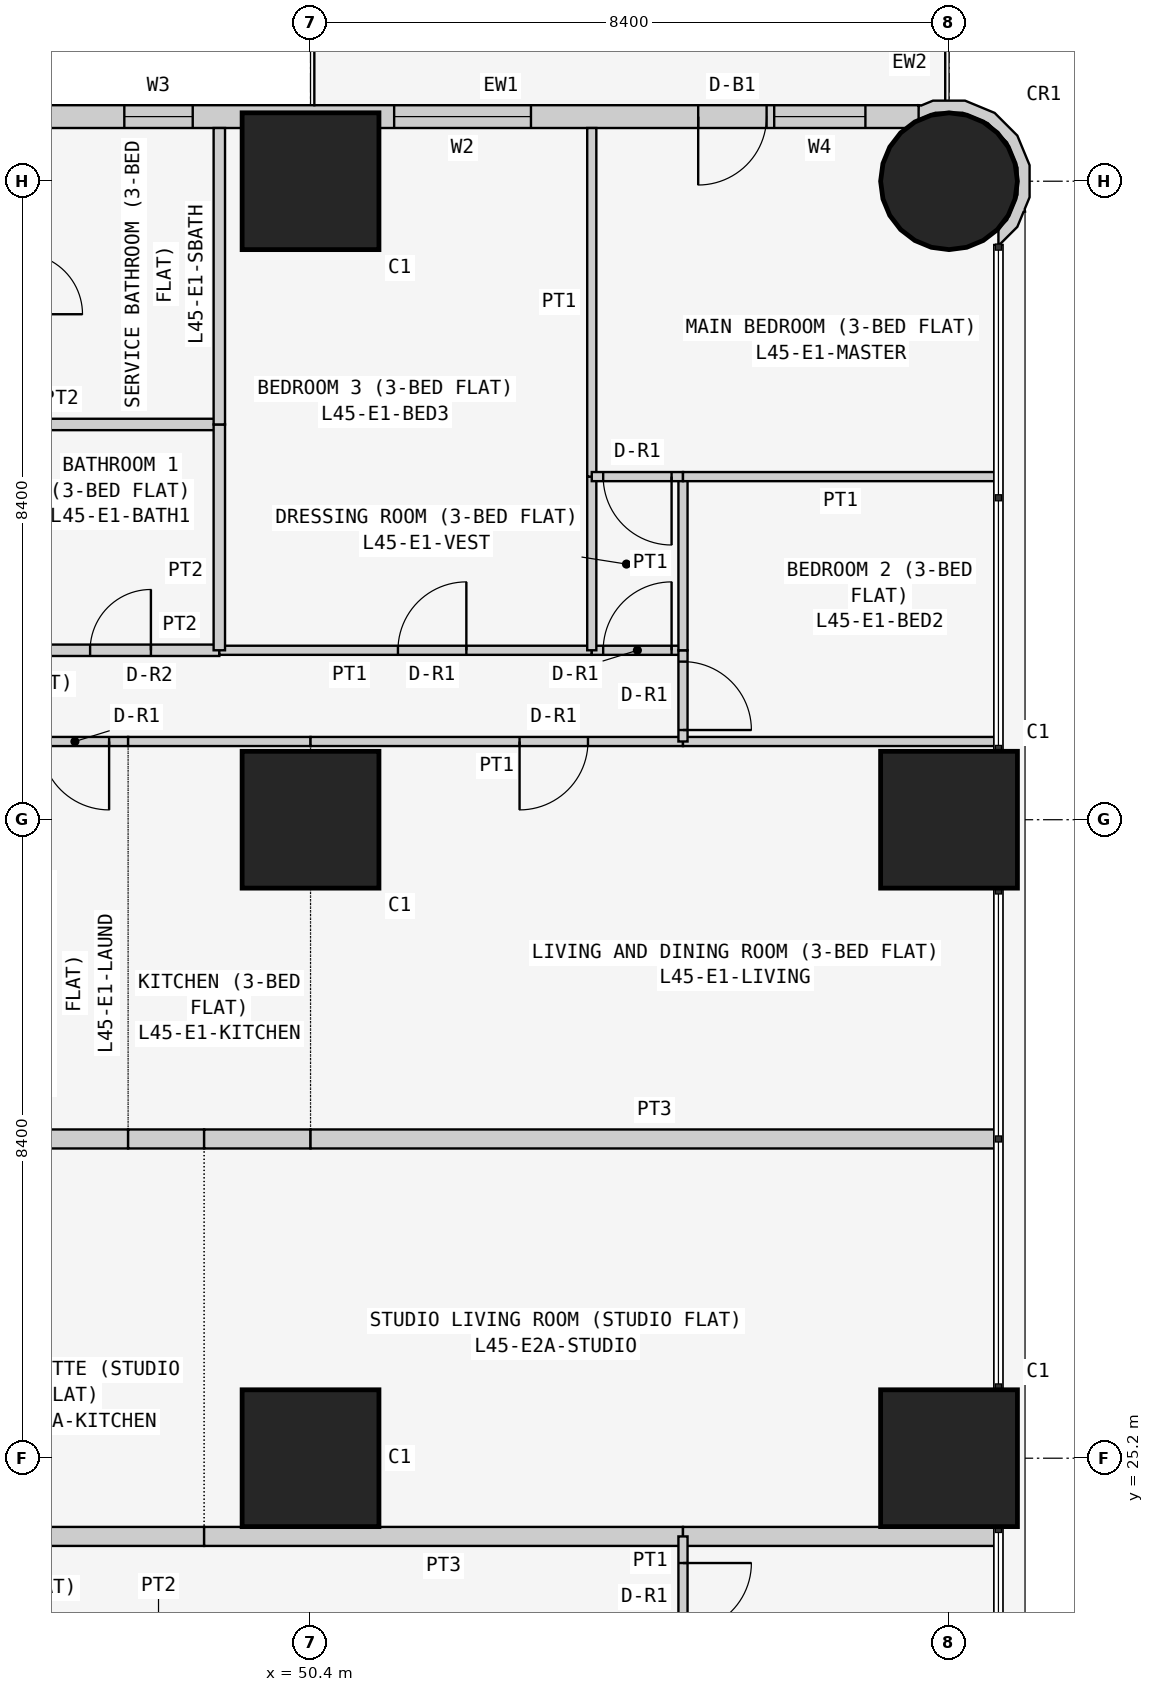
"""IFC4 building model, lengths in metres.
Left out: names, types, materials, properties, quantities, classifications, styles, units other than length and angle.
Written with IfcOpenShell. Run it as: python <this file> out.ifc"""

import sys

from ifc_helpers import new_model, si_unit, direction, frame, frame_2d, origin, origin_2d, place, context, subcontext, project, spatial, polyline, rectangle, circle, outline, extrude, element, fill, save


model = new_model("IFC4")
c1 = context("Model", 3, precision=1e-05, world=origin(), true_north=direction((0.0, 1.0)))
c2 = subcontext(c1, "Body", "Model", "MODEL_VIEW")
j1 = project(units=[si_unit("LENGTHUNIT", "METRE"), si_unit("PLANEANGLEUNIT", "RADIAN")], contexts=[c1])
p1 = place(None, origin())
s1 = spatial("IfcSite", under=j1, at=p1, CompositionType="ELEMENT")
p2 = place(p1, origin())
s2 = spatial("IfcBuilding", under=s1, at=p2, CompositionType="ELEMENT")
p3 = place(p2, frame((0.0, 0.0, 173.7)))
s3 = spatial("IfcBuildingStorey", under=s2, at=p3, CompositionType="ELEMENT", Elevation=173.7)
for number, where, z_axis, x_axis in (
    (1, (50.4, 25.2, 0.0), (0.0, 0.0, 1.0), (1.0, 0.0, 0.0)),
    (2, (50.4, 33.6, 0.0), (0.0, 0.0, 1.0), (1.0, 0.0, 0.0)),
    (3, (50.4, 42.0, 0.0), (0.0, 0.0, 1.0), (1.0, 0.0, 0.0)),
    (4, (58.8, 25.2, 0.0), (0.0, 0.0, 1.0), (1.0, 0.0, 0.0)),
    (5, (58.8, 33.6, 0.0), (0.0, 0.0, 1.0), (1.0, 0.0, 0.0)),
):
    element("IfcColumn", number, at=place(p3, frame(where, z_axis=z_axis, x_axis=x_axis)), inside=s3, PredefinedType="COLUMN", context=c2, shape_type="SweptSolid", body=[
        extrude(rectangle(XDim=1.8, YDim=1.8, at=origin_2d()), origin(), (0.0, 0.0, 1.0), 3.6),
    ])
p4 = place(p3, frame((58.8, 42.0, 0.0), z_axis=(0.0, 0.0, 1.0), x_axis=(1.0, 0.0, 0.0)))
e6 = element("IfcColumn", 6, at=p4, inside=s3, PredefinedType="COLUMN", context=c2, shape_type="SweptSolid", body=[
    extrude(circle(Radius=0.9, at=origin_2d()), origin(), (0.0, 0.0, 1.0), 3.6),
])
p5 = place(p3, frame((58.4, 42.85, 0.0), z_axis=(0.0, 0.0, 1.0), x_axis=(-1.0, 0.0, 0.0)))
e7 = element("IfcWall", 7, at=p5, inside=s3, PredefinedType="SOLIDWALL", context=c2, shape_type="SweptSolid", body=[
    extrude(rectangle(XDim=15.7, YDim=0.3, at=frame_2d((7.85, 0.0))), origin(), (0.0, 0.0, 1.0), 3.35),
])
p6 = place(p5, frame((12.4, 0.0, 0.9)))
e8 = element("IfcOpeningElement", 8, at=p6, cuts=e7, PredefinedType="OPENING", context=c2, shape_type="SweptSolid", body=[
    extrude(rectangle(XDim=1.8, YDim=1.5, at=frame_2d((0.9, 0.75))), frame((0.0, 0.16, 0.0), z_axis=(0.0, -1.0, 0.0), x_axis=(1.0, 0.0, 0.0)), (0.0, 0.0, 1.0), 0.32),
])
p7 = place(p5, frame((9.55, 0.0, 1.5)))
e9 = element("IfcOpeningElement", 9, at=p7, cuts=e7, PredefinedType="OPENING", context=c2, shape_type="SweptSolid", body=[
    extrude(rectangle(XDim=0.9, YDim=0.7, at=frame_2d((0.45, 0.35))), frame((0.0, 0.16, 0.0), z_axis=(0.0, -1.0, 0.0), x_axis=(1.0, 0.0, 0.0)), (0.0, 0.0, 1.0), 0.32),
])
p8 = place(p5, frame((5.1, 0.0, 0.9)))
e10 = element("IfcOpeningElement", 10, at=p8, cuts=e7, PredefinedType="OPENING", context=c2, shape_type="SweptSolid", body=[
    extrude(rectangle(XDim=1.8, YDim=1.5, at=frame_2d((0.9, 0.75))), frame((0.0, 0.16, 0.0), z_axis=(0.0, -1.0, 0.0), x_axis=(1.0, 0.0, 0.0)), (0.0, 0.0, 1.0), 0.32),
])
p9 = place(p5, frame((2.0, 0.0, 0.0)))
e11 = element("IfcOpeningElement", 11, at=p9, cuts=e7, PredefinedType="OPENING", context=c2, shape_type="SweptSolid", body=[
    extrude(rectangle(XDim=0.9, YDim=2.4, at=frame_2d((0.45, 1.2))), frame((0.0, 0.16, 0.0), z_axis=(0.0, -1.0, 0.0), x_axis=(1.0, 0.0, 0.0)), (0.0, 0.0, 1.0), 0.32),
])
p10 = place(p5, frame((0.7, 0.0, 0.9)))
e12 = element("IfcOpeningElement", 12, at=p10, cuts=e7, PredefinedType="OPENING", context=c2, shape_type="SweptSolid", body=[
    extrude(rectangle(XDim=1.2, YDim=1.5, at=frame_2d((0.6, 0.75))), frame((0.0, 0.16, 0.0), z_axis=(0.0, -1.0, 0.0), x_axis=(1.0, 0.0, 0.0)), (0.0, 0.0, 1.0), 0.32),
])
p11 = place(p3, frame((59.411, 41.233, 0.0), z_axis=(0.0, 0.0, 1.0), x_axis=(0.926129809145, 0.377204953059, 0.0)))
e13 = element("IfcWall", 13, at=p11, inside=s3, PredefinedType="SOLIDWALL", context=c2, shape_type="SweptSolid", body=[
    extrude(outline(polyline([(0.626, 0.345), (0.785, 0.736), (0.782, 1.157), (0.619, 1.546), (0.319, 1.843), (-0.072, 2.002), (-0.24, 2.001), (-0.27, 2.017), (-0.37, 1.841), (-0.102, 1.842), (0.23, 1.707), (0.485, 1.455), (0.624, 1.125), (0.626, 0.766), (0.491, 0.434), (0.238, 0.179), (0.09, 0.117), (0.011, -0.078), (0.024, -0.083), (0.329, 0.045), (0.48, 0.198), (0.499, 0.193), (0.508, 0.225), (0.626, 0.345)])), origin(), (0.0, 0.0, 1.0), 3.35),
])
p12 = place(p3, frame((48.0, 34.629, 0.0), z_axis=(0.0, 0.0, 1.0), x_axis=(-1.0, 0.0, 0.0)))
e14 = element("IfcWall", 14, at=p12, inside=s3, PredefinedType="PARTITIONING", context=c2, shape_type="SweptSolid", body=[
    extrude(rectangle(XDim=1.4, YDim=0.12, at=frame_2d((0.7, 0.0))), origin(), (0.0, 0.0, 1.0), 3.35),
])
p13 = place(p12, frame((0.25, 0.0, 0.0)))
e15 = element("IfcOpeningElement", 15, at=p13, cuts=e14, PredefinedType="OPENING", context=c2, shape_type="SweptSolid", body=[
    extrude(rectangle(XDim=0.9, YDim=2.1, at=frame_2d((0.45, 1.05))), frame((0.0, 0.07, 0.0), z_axis=(0.0, -1.0, 0.0), x_axis=(1.0, 0.0, 0.0)), (0.0, 0.0, 1.0), 0.14),
])
p14 = place(p3, frame((46.6, 29.4, 0.0), z_axis=(0.0, 0.0, 1.0), x_axis=(1.0, 0.0, 0.0)))
e16 = element("IfcWall", 16, at=p14, inside=s3, PredefinedType="PARTITIONING", context=c2, shape_type="SweptSolid", body=[
    extrude(rectangle(XDim=1.4, YDim=0.25, at=frame_2d((0.7, 0.0))), origin(), (0.0, 0.0, 1.0), 3.35),
])
p15 = place(p3, frame((50.4, 34.629, 0.0), z_axis=(0.0, 0.0, 1.0), x_axis=(-1.0, 0.0, 0.0)))
e17 = element("IfcWall", 17, at=p15, inside=s3, PredefinedType="PARTITIONING", context=c2, shape_type="SweptSolid", body=[
    extrude(rectangle(XDim=2.4, YDim=0.12, at=frame_2d((1.2, 0.0))), origin(), (0.0, 0.0, 1.0), 3.35),
])
p16 = place(p3, frame((48.0, 29.4, 0.0), z_axis=(0.0, 0.0, 1.0), x_axis=(1.0, 0.0, 0.0)))
e18 = element("IfcWall", 18, at=p16, inside=s3, PredefinedType="PARTITIONING", context=c2, shape_type="SweptSolid", body=[
    extrude(rectangle(XDim=1.0, YDim=0.25, at=frame_2d((0.5, 0.0))), origin(), (0.0, 0.0, 1.0), 3.35),
])
p17 = place(p3, frame((49.0, 29.4, 0.0), z_axis=(0.0, 0.0, 1.0), x_axis=(1.0, 0.0, 0.0)))
e19 = element("IfcWall", 19, at=p17, inside=s3, PredefinedType="PARTITIONING", context=c2, shape_type="SweptSolid", body=[
    extrude(rectangle(XDim=1.4, YDim=0.25, at=frame_2d((0.7, 0.0))), origin(), (0.0, 0.0, 1.0), 3.35),
])
p18 = place(p3, frame((55.3, 34.629, 0.0), z_axis=(0.0, 0.0, 1.0), x_axis=(-1.0, 0.0, 0.0)))
e20 = element("IfcWall", 20, at=p18, inside=s3, PredefinedType="PARTITIONING", context=c2, shape_type="SweptSolid", body=[
    extrude(rectangle(XDim=4.9, YDim=0.12, at=frame_2d((2.45, 0.0))), origin(), (0.0, 0.0, 1.0), 3.35),
])
p19 = place(p18, frame((1.25, 0.0, 0.0)))
e21 = element("IfcOpeningElement", 21, at=p19, cuts=e20, PredefinedType="OPENING", context=c2, shape_type="SweptSolid", body=[
    extrude(rectangle(XDim=0.9, YDim=2.1, at=frame_2d((0.45, 1.05))), frame((0.0, 0.07, 0.0), z_axis=(0.0, -1.0, 0.0), x_axis=(1.0, 0.0, 0.0)), (0.0, 0.0, 1.0), 0.14),
])
p20 = place(p3, frame((59.45, 34.629, 0.0), z_axis=(0.0, 0.0, 1.0), x_axis=(-1.0, 0.0, 0.0)))
e22 = element("IfcWall", 22, at=p20, inside=s3, PredefinedType="PARTITIONING", context=c2, shape_type="SweptSolid", body=[
    extrude(rectangle(XDim=4.15, YDim=0.12, at=frame_2d((2.075, 0.0))), origin(), (0.0, 0.0, 1.0), 3.35),
])
p21 = place(p3, frame((50.4, 29.4, 0.0), z_axis=(0.0, 0.0, 1.0), x_axis=(1.0, 0.0, 0.0)))
e23 = element("IfcWall", 23, at=p21, inside=s3, PredefinedType="PARTITIONING", context=c2, shape_type="SweptSolid", body=[
    extrude(rectangle(XDim=9.05, YDim=0.25, at=frame_2d((4.525, 0.0))), origin(), (0.0, 0.0, 1.0), 3.35),
])
p22 = place(p3, frame((49.2, 35.829, 0.0), z_axis=(0.0, 0.0, 1.0), x_axis=(-1.0, 0.0, 0.0)))
e24 = element("IfcWall", 24, at=p22, inside=s3, PredefinedType="PARTITIONING", context=c2, shape_type="SweptSolid", body=[
    extrude(rectangle(XDim=2.6, YDim=0.15, at=frame_2d((1.3, 0.0))), origin(), (0.0, 0.0, 1.0), 3.35),
])
p23 = place(p22, frame((0.9, 0.0, 0.0)))
e25 = element("IfcOpeningElement", 25, at=p23, cuts=e24, PredefinedType="OPENING", context=c2, shape_type="SweptSolid", body=[
    extrude(rectangle(XDim=0.8, YDim=2.1, at=frame_2d((0.4, 1.05))), frame((0.0, 0.085, 0.0), z_axis=(0.0, -1.0, 0.0), x_axis=(1.0, 0.0, 0.0)), (0.0, 0.0, 1.0), 0.17),
])
p24 = place(p3, frame((54.1, 35.829, 0.0), z_axis=(0.0, 0.0, 1.0), x_axis=(-1.0, 0.0, 0.0)))
e26 = element("IfcWall", 26, at=p24, inside=s3, PredefinedType="PARTITIONING", context=c2, shape_type="SweptSolid", body=[
    extrude(rectangle(XDim=4.9, YDim=0.12, at=frame_2d((2.45, 0.0))), origin(), (0.0, 0.0, 1.0), 3.35),
])
p25 = place(p24, frame((1.65, 0.0, 0.0)))
e27 = element("IfcOpeningElement", 27, at=p25, cuts=e26, PredefinedType="OPENING", context=c2, shape_type="SweptSolid", body=[
    extrude(rectangle(XDim=0.9, YDim=2.1, at=frame_2d((0.45, 1.05))), frame((0.0, 0.07, 0.0), z_axis=(0.0, -1.0, 0.0), x_axis=(1.0, 0.0, 0.0)), (0.0, 0.0, 1.0), 0.14),
])
p26 = place(p3, frame((55.3, 35.829, 0.0), z_axis=(0.0, 0.0, 1.0), x_axis=(-1.0, 0.0, 0.0)))
e28 = element("IfcWall", 28, at=p26, inside=s3, PredefinedType="PARTITIONING", context=c2, shape_type="SweptSolid", body=[
    extrude(rectangle(XDim=1.2, YDim=0.12, at=frame_2d((0.6, 0.0))), origin(), (0.0, 0.0, 1.0), 3.35),
])
p27 = place(p26, frame((0.15, 0.0, 0.0)))
e29 = element("IfcOpeningElement", 29, at=p27, cuts=e28, PredefinedType="OPENING", context=c2, shape_type="SweptSolid", body=[
    extrude(rectangle(XDim=0.9, YDim=2.1, at=frame_2d((0.45, 1.05))), frame((0.0, 0.07, 0.0), z_axis=(0.0, -1.0, 0.0), x_axis=(1.0, 0.0, 0.0)), (0.0, 0.0, 1.0), 0.14),
])
p28 = place(p3, frame((55.3, 34.629, 0.0), z_axis=(0.0, 0.0, 1.0), x_axis=(0.0, 1.0, 0.0)))
e30 = element("IfcWall", 30, at=p28, inside=s3, PredefinedType="PARTITIONING", context=c2, shape_type="SweptSolid", body=[
    extrude(rectangle(XDim=1.2, YDim=0.12, at=frame_2d((0.6, 0.0))), origin(), (0.0, 0.0, 1.0), 3.35),
])
p29 = place(p28, frame((0.151, 0.0, 0.0)))
e31 = element("IfcOpeningElement", 31, at=p29, cuts=e30, PredefinedType="OPENING", context=c2, shape_type="SweptSolid", body=[
    extrude(rectangle(XDim=0.9, YDim=2.1, at=frame_2d((0.45, 1.05))), frame((0.0, 0.07, 0.0), z_axis=(0.0, -1.0, 0.0), x_axis=(1.0, 0.0, 0.0)), (0.0, 0.0, 1.0), 0.14),
])
p30 = place(p3, frame((49.2, 38.8, 0.0), z_axis=(0.0, 0.0, 1.0), x_axis=(-1.0, 0.0, 0.0)))
e32 = element("IfcWall", 32, at=p30, inside=s3, PredefinedType="PARTITIONING", context=c2, shape_type="SweptSolid", body=[
    extrude(rectangle(XDim=2.6, YDim=0.15, at=frame_2d((1.3, 0.0))), origin(), (0.0, 0.0, 1.0), 3.35),
])
p31 = place(p3, frame((49.2, 35.829, 0.0), z_axis=(0.0, 0.0, 1.0), x_axis=(0.0, 1.0, 0.0)))
e33 = element("IfcWall", 33, at=p31, inside=s3, PredefinedType="PARTITIONING", context=c2, shape_type="SweptSolid", body=[
    extrude(rectangle(XDim=2.971, YDim=0.15, at=frame_2d((1.485, 0.0))), origin(), (0.0, 0.0, 1.0), 3.35),
])
p32 = place(p3, frame((49.2, 38.8, 0.0), z_axis=(0.0, 0.0, 1.0), x_axis=(0.0, 1.0, 0.0)))
e34 = element("IfcWall", 34, at=p32, inside=s3, PredefinedType="PARTITIONING", context=c2, shape_type="SweptSolid", body=[
    extrude(rectangle(XDim=3.9, YDim=0.15, at=frame_2d((1.95, 0.0))), origin(), (0.0, 0.0, 1.0), 3.35),
])
p33 = place(p3, frame((54.1, 35.829, 0.0), z_axis=(0.0, 0.0, 1.0), x_axis=(0.0, 1.0, 0.0)))
e35 = element("IfcWall", 35, at=p33, inside=s3, PredefinedType="PARTITIONING", context=c2, shape_type="SweptSolid", body=[
    extrude(rectangle(XDim=2.285, YDim=0.12, at=frame_2d((1.143, 0.0))), origin(), (0.0, 0.0, 1.0), 3.35),
])
p34 = place(p3, frame((54.1, 38.114, 0.0), z_axis=(0.0, 0.0, 1.0), x_axis=(0.0, 1.0, 0.0)))
e36 = element("IfcWall", 36, at=p34, inside=s3, PredefinedType="PARTITIONING", context=c2, shape_type="SweptSolid", body=[
    extrude(rectangle(XDim=4.586, YDim=0.12, at=frame_2d((2.293, 0.0))), origin(), (0.0, 0.0, 1.0), 3.35),
])
p35 = place(p3, frame((55.3, 35.829, 0.0), z_axis=(0.0, 0.0, 1.0), x_axis=(0.0, 1.0, 0.0)))
e37 = element("IfcWall", 37, at=p35, inside=s3, PredefinedType="PARTITIONING", context=c2, shape_type="SweptSolid", body=[
    extrude(rectangle(XDim=2.285, YDim=0.12, at=frame_2d((1.143, 0.0))), origin(), (0.0, 0.0, 1.0), 3.35),
])
p36 = place(p3, frame((55.3, 38.114, 0.0), z_axis=(0.0, 0.0, 1.0), x_axis=(-1.0, 0.0, 0.0)))
e38 = element("IfcWall", 38, at=p36, inside=s3, PredefinedType="PARTITIONING", context=c2, shape_type="SweptSolid", body=[
    extrude(rectangle(XDim=1.2, YDim=0.12, at=frame_2d((0.6, 0.0))), origin(), (0.0, 0.0, 1.0), 3.35),
])
p37 = place(p36, frame((0.15, 0.0, 0.0)))
e39 = element("IfcOpeningElement", 39, at=p37, cuts=e38, PredefinedType="OPENING", context=c2, shape_type="SweptSolid", body=[
    extrude(rectangle(XDim=0.9, YDim=2.1, at=frame_2d((0.45, 1.05))), frame((0.0, 0.07, 0.0), z_axis=(0.0, -1.0, 0.0), x_axis=(1.0, 0.0, 0.0)), (0.0, 0.0, 1.0), 0.14),
])
p38 = place(p3, frame((59.45, 38.114, 0.0), z_axis=(0.0, 0.0, 1.0), x_axis=(-1.0, 0.0, 0.0)))
e40 = element("IfcWall", 40, at=p38, inside=s3, PredefinedType="PARTITIONING", context=c2, shape_type="SweptSolid", body=[
    extrude(rectangle(XDim=4.15, YDim=0.12, at=frame_2d((2.075, 0.0))), origin(), (0.0, 0.0, 1.0), 3.35),
])
p39 = place(p3, frame((49.0, 24.171, 0.0), z_axis=(0.0, 0.0, 1.0), x_axis=(-1.0, 0.0, 0.0)))
e41 = element("IfcWall", 41, at=p39, inside=s3, PredefinedType="PARTITIONING", context=c2, shape_type="SweptSolid", body=[
    extrude(rectangle(XDim=3.6, YDim=0.25, at=frame_2d((1.8, 0.0))), origin(), (0.0, 0.0, 1.0), 3.35),
])
p40 = place(p3, frame((55.3, 24.171, 0.0), z_axis=(0.0, 0.0, 1.0), x_axis=(-1.0, 0.0, 0.0)))
e42 = element("IfcWall", 42, at=p40, inside=s3, PredefinedType="PARTITIONING", context=c2, shape_type="SweptSolid", body=[
    extrude(rectangle(XDim=6.3, YDim=0.25, at=frame_2d((3.15, 0.0))), origin(), (0.0, 0.0, 1.0), 3.35),
])
p41 = place(p3, frame((59.45, 24.171, 0.0), z_axis=(0.0, 0.0, 1.0), x_axis=(-1.0, 0.0, 0.0)))
e43 = element("IfcWall", 43, at=p41, inside=s3, PredefinedType="PARTITIONING", context=c2, shape_type="SweptSolid", body=[
    extrude(rectangle(XDim=4.15, YDim=0.25, at=frame_2d((2.075, 0.0))), origin(), (0.0, 0.0, 1.0), 3.35),
])
p42 = place(p3, frame((55.3, 24.171, 0.0), z_axis=(0.0, 0.0, 1.0), x_axis=(0.0, -1.0, 0.0)))
e44 = element("IfcWall", 44, at=p42, inside=s3, PredefinedType="PARTITIONING", context=c2, shape_type="SweptSolid", body=[
    extrude(rectangle(XDim=1.6, YDim=0.12, at=frame_2d((0.8, 0.0))), origin(), (0.0, 0.0, 1.0), 3.35),
])
p43 = place(p42, frame((0.35, 0.0, 0.0)))
e45 = element("IfcOpeningElement", 45, at=p43, cuts=e44, PredefinedType="OPENING", context=c2, shape_type="SweptSolid", body=[
    extrude(rectangle(XDim=0.9, YDim=2.1, at=frame_2d((0.45, 1.05))), frame((0.0, 0.07, 0.0), z_axis=(0.0, -1.0, 0.0), x_axis=(1.0, 0.0, 0.0)), (0.0, 0.0, 1.0), 0.14),
])
p44 = place(p7, origin())
e46 = element("IfcWindow", 46, at=p44, inside=s3, PartitioningType="SINGLE_PANEL", PredefinedType="WINDOW", context=c2, shape_type="SweptSolid", body=[
    extrude(rectangle(XDim=0.9, YDim=0.7, at=frame_2d((0.45, 0.35))), frame((0.0, 0.03, 0.0), z_axis=(0.0, -1.0, 0.0), x_axis=(1.0, 0.0, 0.0)), (0.0, 0.0, 1.0), 0.06),
])
fill(e9, e46)
p45 = place(p8, origin())
e47 = element("IfcWindow", 47, at=p45, inside=s3, PartitioningType="SINGLE_PANEL", PredefinedType="WINDOW", context=c2, shape_type="SweptSolid", body=[
    extrude(rectangle(XDim=1.8, YDim=1.5, at=frame_2d((0.9, 0.75))), frame((0.0, 0.03, 0.0), z_axis=(0.0, -1.0, 0.0), x_axis=(1.0, 0.0, 0.0)), (0.0, 0.0, 1.0), 0.06),
])
fill(e10, e47)
p46 = place(p9, origin())
e48 = element("IfcDoor", 48, at=p46, inside=s3, OperationType="SINGLE_SWING_RIGHT", PredefinedType="DOOR", context=c2, shape_type="SweptSolid", body=[
    extrude(rectangle(XDim=0.9, YDim=2.4, at=frame_2d((0.45, 1.2))), frame((0.0, 0.025, 0.0), z_axis=(0.0, -1.0, 0.0), x_axis=(1.0, 0.0, 0.0)), (0.0, 0.0, 1.0), 0.05),
])
fill(e11, e48)
p47 = place(p10, origin())
e49 = element("IfcWindow", 49, at=p47, inside=s3, PartitioningType="SINGLE_PANEL", PredefinedType="WINDOW", context=c2, shape_type="SweptSolid", body=[
    extrude(rectangle(XDim=1.2, YDim=1.5, at=frame_2d((0.6, 0.75))), frame((0.0, 0.03, 0.0), z_axis=(0.0, -1.0, 0.0), x_axis=(1.0, 0.0, 0.0)), (0.0, 0.0, 1.0), 0.06),
])
fill(e12, e49)
p48 = place(p13, origin())
e50 = element("IfcDoor", 50, at=p48, inside=s3, OperationType="SINGLE_SWING_LEFT", PredefinedType="DOOR", context=c2, shape_type="SweptSolid", body=[
    extrude(rectangle(XDim=0.9, YDim=2.1, at=frame_2d((0.45, 1.05))), frame((0.0, 0.025, 0.0), z_axis=(0.0, -1.0, 0.0), x_axis=(1.0, 0.0, 0.0)), (0.0, 0.0, 1.0), 0.05),
])
fill(e15, e50)
p49 = place(p19, origin())
e51 = element("IfcDoor", 51, at=p49, inside=s3, OperationType="SINGLE_SWING_RIGHT", PredefinedType="DOOR", context=c2, shape_type="SweptSolid", body=[
    extrude(rectangle(XDim=0.9, YDim=2.1, at=frame_2d((0.45, 1.05))), frame((0.0, 0.025, 0.0), z_axis=(0.0, -1.0, 0.0), x_axis=(1.0, 0.0, 0.0)), (0.0, 0.0, 1.0), 0.05),
])
fill(e21, e51)
p50 = place(p23, frame((0.8, 0.0, 0.0), z_axis=(0.0, 0.0, 1.0), x_axis=(-1.0, 0.0, 0.0)))
e52 = element("IfcDoor", 52, at=p50, inside=s3, OperationType="SINGLE_SWING_RIGHT", PredefinedType="DOOR", context=c2, shape_type="SweptSolid", body=[
    extrude(rectangle(XDim=0.8, YDim=2.1, at=frame_2d((0.4, 1.05))), frame((0.0, 0.025, 0.0), z_axis=(0.0, -1.0, 0.0), x_axis=(1.0, 0.0, 0.0)), (0.0, 0.0, 1.0), 0.05),
])
fill(e25, e52)
p51 = place(p25, frame((0.9, 0.0, 0.0), z_axis=(0.0, 0.0, 1.0), x_axis=(-1.0, 0.0, 0.0)))
e53 = element("IfcDoor", 53, at=p51, inside=s3, OperationType="SINGLE_SWING_RIGHT", PredefinedType="DOOR", context=c2, shape_type="SweptSolid", body=[
    extrude(rectangle(XDim=0.9, YDim=2.1, at=frame_2d((0.45, 1.05))), frame((0.0, 0.025, 0.0), z_axis=(0.0, -1.0, 0.0), x_axis=(1.0, 0.0, 0.0)), (0.0, 0.0, 1.0), 0.05),
])
fill(e27, e53)
p52 = place(p27, frame((0.9, 0.0, 0.0), z_axis=(0.0, 0.0, 1.0), x_axis=(-1.0, 0.0, 0.0)))
e54 = element("IfcDoor", 54, at=p52, inside=s3, OperationType="SINGLE_SWING_RIGHT", PredefinedType="DOOR", context=c2, shape_type="SweptSolid", body=[
    extrude(rectangle(XDim=0.9, YDim=2.1, at=frame_2d((0.45, 1.05))), frame((0.0, 0.025, 0.0), z_axis=(0.0, -1.0, 0.0), x_axis=(1.0, 0.0, 0.0)), (0.0, 0.0, 1.0), 0.05),
])
fill(e29, e54)
p53 = place(p37, origin())
e55 = element("IfcDoor", 55, at=p53, inside=s3, OperationType="SINGLE_SWING_LEFT", PredefinedType="DOOR", context=c2, shape_type="SweptSolid", body=[
    extrude(rectangle(XDim=0.9, YDim=2.1, at=frame_2d((0.45, 1.05))), frame((0.0, 0.025, 0.0), z_axis=(0.0, -1.0, 0.0), x_axis=(1.0, 0.0, 0.0)), (0.0, 0.0, 1.0), 0.05),
])
fill(e39, e55)
p54 = place(p29, frame((0.9, 0.0, 0.0), z_axis=(0.0, 0.0, 1.0), x_axis=(-1.0, 0.0, 0.0)))
e56 = element("IfcDoor", 56, at=p54, inside=s3, OperationType="SINGLE_SWING_RIGHT", PredefinedType="DOOR", context=c2, shape_type="SweptSolid", body=[
    extrude(rectangle(XDim=0.9, YDim=2.1, at=frame_2d((0.45, 1.05))), frame((0.0, 0.025, 0.0), z_axis=(0.0, -1.0, 0.0), x_axis=(1.0, 0.0, 0.0)), (0.0, 0.0, 1.0), 0.05),
])
fill(e31, e56)
p55 = place(p43, origin())
e57 = element("IfcDoor", 57, at=p55, inside=s3, OperationType="SINGLE_SWING_LEFT", PredefinedType="DOOR", context=c2, shape_type="SweptSolid", body=[
    extrude(rectangle(XDim=0.9, YDim=2.1, at=frame_2d((0.45, 1.05))), frame((0.0, 0.025, 0.0), z_axis=(0.0, -1.0, 0.0), x_axis=(1.0, 0.0, 0.0)), (0.0, 0.0, 1.0), 0.05),
])
fill(e45, e57)
save(model, sys.argv[1])
